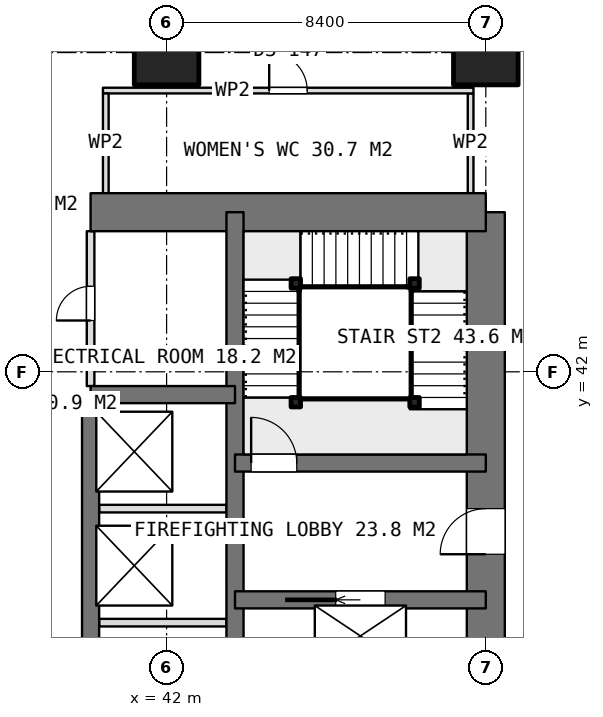
"""IFC4 building model, lengths in metres.
Left out: names, types, materials, properties, quantities, classifications, styles, units other than length and angle.
Written with IfcOpenShell. Run it as: python <this file> out.ifc"""

import sys

from ifc_helpers import new_model, si_unit, direction, frame, frame_2d, origin, origin_2d, place, context, subcontext, project, spatial, rectangle, extrude, element, fill, save


model = new_model("IFC4")
c1 = context("Model", 3, precision=1e-05, world=origin(), true_north=direction((0.0, 1.0)))
c2 = subcontext(c1, "Body", "Model", "MODEL_VIEW")
j1 = project(units=[si_unit("LENGTHUNIT", "METRE"), si_unit("PLANEANGLEUNIT", "RADIAN")], contexts=[c1])
p1 = place(None, origin())
s1 = spatial("IfcSite", under=j1, at=p1, CompositionType="ELEMENT")
p2 = place(p1, origin())
s2 = spatial("IfcBuilding", under=s1, at=p2, CompositionType="ELEMENT")
p3 = place(p2, frame((0.0, 0.0, 136.55)))
s3 = spatial("IfcBuildingStorey", under=s2, at=p3, CompositionType="ELEMENT", Elevation=136.55)
p4 = place(p3, frame((40.0, 46.2, 0.0), z_axis=(0.0, 0.0, 1.0), x_axis=(1.0, 0.0, 0.0)))
e1 = element("IfcWall", 1, at=p4, inside=s3, PredefinedType="SHEAR", context=c2, shape_type="SweptSolid", body=[
    extrude(rectangle(XDim=10.4, YDim=1.0, at=frame_2d((5.2, 0.0))), origin(), (0.0, 0.0, 1.0), 3.75),
])
p5 = place(p3, frame((50.4, 21.0, 0.0), z_axis=(0.0, 0.0, 1.0), x_axis=(0.0, 1.0, 0.0)))
e2 = element("IfcWall", 2, at=p5, inside=s3, PredefinedType="SHEAR", context=c2, shape_type="SweptSolid", body=[
    extrude(rectangle(XDim=25.2, YDim=1.0, at=frame_2d((12.6, 0.0))), origin(), (0.0, 0.0, 1.0), 3.75),
])
p6 = place(p5, frame((16.2, 0.0, 0.0)))
e3 = element("IfcOpeningElement", 3, at=p6, cuts=e2, PredefinedType="OPENING", context=c2, shape_type="SweptSolid", body=[
    extrude(rectangle(XDim=1.2, YDim=2.1, at=frame_2d((0.6, 1.05))), frame((0.0, 0.51, 0.0), z_axis=(0.0, -1.0, 0.0), x_axis=(1.0, 0.0, 0.0)), (0.0, 0.0, 1.0), 1.02),
])
p7 = place(p5, frame((10.05, 0.0, 0.0)))
e4 = element("IfcOpeningElement", 4, at=p7, cuts=e2, PredefinedType="OPENING", context=c2, shape_type="SweptSolid", body=[
    extrude(rectangle(XDim=0.9, YDim=2.1, at=frame_2d((0.45, 1.05))), frame((0.0, 0.51, 0.0), z_axis=(0.0, -1.0, 0.0), x_axis=(1.0, 0.0, 0.0)), (0.0, 0.0, 1.0), 1.02),
])
p8 = place(p5, frame((7.45, 0.0, 0.0)))
e5 = element("IfcOpeningElement", 5, at=p8, cuts=e2, PredefinedType="OPENING", context=c2, shape_type="SweptSolid", body=[
    extrude(rectangle(XDim=0.9, YDim=2.1, at=frame_2d((0.45, 1.05))), frame((0.0, 0.51, 0.0), z_axis=(0.0, -1.0, 0.0), x_axis=(1.0, 0.0, 0.0)), (0.0, 0.0, 1.0), 1.02),
])
p9 = place(p5, frame((0.7, 0.0, 0.0)))
e6 = element("IfcOpeningElement", 6, at=p9, cuts=e2, PredefinedType="OPENING", context=c2, shape_type="SweptSolid", body=[
    extrude(rectangle(XDim=1.2, YDim=2.1, at=frame_2d((0.6, 1.05))), frame((0.0, 0.51, 0.0), z_axis=(0.0, -1.0, 0.0), x_axis=(1.0, 0.0, 0.0)), (0.0, 0.0, 1.0), 1.02),
])
p10 = place(p3, frame((43.8, 21.0, 0.0), z_axis=(0.0, 0.0, 1.0), x_axis=(0.0, 1.0, 0.0)))
e7 = element("IfcWall", 7, at=p10, inside=s3, PredefinedType="SHEAR", context=c2, shape_type="SweptSolid", body=[
    extrude(rectangle(XDim=25.2, YDim=0.45, at=frame_2d((12.6, 0.0))), origin(), (0.0, 0.0, 1.0), 3.75),
])
p11 = place(p3, frame((40.0, 23.4, 0.0), z_axis=(0.0, 0.0, 1.0), x_axis=(0.0, 1.0, 0.0)))
e8 = element("IfcWall", 8, at=p11, inside=s3, PredefinedType="SHEAR", context=c2, shape_type="SweptSolid", body=[
    extrude(rectangle(XDim=18.0, YDim=0.45, at=frame_2d((9.0, 0.0))), origin(), (0.0, 0.0, 1.0), 3.75),
])
p12 = place(p11, frame((2.55, 0.0, 0.0)))
e9 = element("IfcOpeningElement", 9, at=p12, cuts=e8, PredefinedType="OPENING", context=c2, shape_type="SweptSolid", body=[
    extrude(rectangle(XDim=0.9, YDim=2.1, at=frame_2d((0.45, 1.05))), frame((0.0, 0.235, 0.0), z_axis=(0.0, -1.0, 0.0), x_axis=(1.0, 0.0, 0.0)), (0.0, 0.0, 1.0), 0.47),
])
p13 = place(p3, frame((40.0, 41.4, 0.0), z_axis=(0.0, 0.0, 1.0), x_axis=(1.0, 0.0, 0.0)))
e10 = element("IfcWall", 10, at=p13, inside=s3, PredefinedType="SHEAR", context=c2, shape_type="SweptSolid", body=[
    extrude(rectangle(XDim=3.8, YDim=0.45, at=frame_2d((1.9, 0.0))), origin(), (0.0, 0.0, 1.0), 3.75),
])
p14 = place(p3, frame((43.8, 36.0, 0.0), z_axis=(0.0, 0.0, 1.0), x_axis=(1.0, 0.0, 0.0)))
e11 = element("IfcWall", 11, at=p14, inside=s3, PredefinedType="SHEAR", context=c2, shape_type="SweptSolid", body=[
    extrude(rectangle(XDim=6.6, YDim=0.45, at=frame_2d((3.3, 0.0))), origin(), (0.0, 0.0, 1.0), 3.75),
])
p15 = place(p14, frame((2.65, 0.0, 0.0)))
e12 = element("IfcOpeningElement", 12, at=p15, cuts=e11, PredefinedType="OPENING", context=c2, shape_type="SweptSolid", body=[
    extrude(rectangle(XDim=1.3, YDim=2.1, at=frame_2d((0.65, 1.05))), frame((0.0, 0.235, 0.0), z_axis=(0.0, -1.0, 0.0), x_axis=(1.0, 0.0, 0.0)), (0.0, 0.0, 1.0), 0.47),
])
p16 = place(p3, frame((43.8, 39.6, 0.0), z_axis=(0.0, 0.0, 1.0), x_axis=(1.0, 0.0, 0.0)))
e13 = element("IfcWall", 13, at=p16, inside=s3, PredefinedType="SHEAR", context=c2, shape_type="SweptSolid", body=[
    extrude(rectangle(XDim=6.6, YDim=0.45, at=frame_2d((3.3, 0.0))), origin(), (0.0, 0.0, 1.0), 3.75),
])
p17 = place(p16, frame((0.425, 0.0, 0.0)))
e14 = element("IfcOpeningElement", 14, at=p17, cuts=e13, PredefinedType="OPENING", context=c2, shape_type="SweptSolid", body=[
    extrude(rectangle(XDim=1.2, YDim=2.1, at=frame_2d((0.6, 1.05))), frame((0.0, 0.235, 0.0), z_axis=(0.0, -1.0, 0.0), x_axis=(1.0, 0.0, 0.0)), (0.0, 0.0, 1.0), 0.47),
])
for number, where, z_axis, x_axis in (
    (15, (42.0, 50.4, 0.0), (0.0, 0.0, 1.0), (1.0, 0.0, 0.0)),
    (16, (50.4, 50.4, 0.0), (0.0, 0.0, 1.0), (1.0, 0.0, 0.0)),
):
    element("IfcColumn", number, at=place(p3, frame(where, z_axis=z_axis, x_axis=x_axis)), inside=s3, PredefinedType="COLUMN", context=c2, shape_type="SweptSolid", body=[
        extrude(rectangle(XDim=1.7, YDim=1.7, at=origin_2d()), origin(), (0.0, 0.0, 1.0), 3.75),
    ])
for number, where, z_axis, x_axis in (
    (17, (40.225, 35.4, 0.0), (0.0, 0.0, 1.0), (1.0, 0.0, 0.0)),
    (18, (40.225, 38.4, 0.0), (0.0, 0.0, 1.0), (1.0, 0.0, 0.0)),
):
    element("IfcWall", number, at=place(p3, frame(where, z_axis=z_axis, x_axis=x_axis)), inside=s3, PredefinedType="PARTITIONING", context=c2, shape_type="SweptSolid", body=[
        extrude(rectangle(XDim=3.35, YDim=0.2, at=frame_2d((1.675, 0.0))), origin(), (0.0, 0.0, 1.0), 3.5),
    ])
p18 = place(p3, frame((40.0, 41.625, 0.0), z_axis=(0.0, 0.0, 1.0), x_axis=(0.0, 1.0, 0.0)))
e19 = element("IfcWall", 19, at=p18, inside=s3, PredefinedType="PARTITIONING", context=c2, shape_type="SweptSolid", body=[
    extrude(rectangle(XDim=4.075, YDim=0.2, at=frame_2d((2.038, 0.0))), origin(), (0.0, 0.0, 1.0), 3.5),
])
p19 = place(p18, frame((1.725, 0.0, 0.0)))
e20 = element("IfcOpeningElement", 20, at=p19, cuts=e19, PredefinedType="OPENING", context=c2, shape_type="SweptSolid", body=[
    extrude(rectangle(XDim=0.9, YDim=2.1, at=frame_2d((0.45, 1.05))), frame((0.0, 0.11, 0.0), z_axis=(0.0, -1.0, 0.0), x_axis=(1.0, 0.0, 0.0)), (0.0, 0.0, 1.0), 0.22),
])
p20 = place(p3, frame((40.325, 49.4, 0.0), z_axis=(0.0, 0.0, 1.0), x_axis=(1.0, 0.0, 0.0)))
e21 = element("IfcWall", 21, at=p20, inside=s3, PredefinedType="PARTITIONING", context=c2, shape_type="SweptSolid", body=[
    extrude(rectangle(XDim=9.75, YDim=0.15, at=frame_2d((4.875, 0.0))), origin(), (0.0, 0.0, 1.0), 3.5),
])
p21 = place(p20, frame((4.375, 0.0, 0.0)))
e22 = element("IfcOpeningElement", 22, at=p21, cuts=e21, PredefinedType="OPENING", context=c2, shape_type="SweptSolid", body=[
    extrude(rectangle(XDim=1.0, YDim=2.1, at=frame_2d((0.5, 1.05))), frame((0.0, 0.085, 0.0), z_axis=(0.0, -1.0, 0.0), x_axis=(1.0, 0.0, 0.0)), (0.0, 0.0, 1.0), 0.17),
])
for number, where, z_axis, x_axis in (
    (23, (40.4, 46.7, 0.0), (0.0, 0.0, 1.0), (0.0, 1.0, 0.0)),
    (24, (50.0, 46.7, 0.0), (0.0, 0.0, 1.0), (0.0, 1.0, 0.0)),
):
    element("IfcWall", number, at=place(p3, frame(where, z_axis=z_axis, x_axis=x_axis)), inside=s3, PredefinedType="PARTITIONING", context=c2, shape_type="SweptSolid", body=[
        extrude(rectangle(XDim=2.625, YDim=0.15, at=frame_2d((1.312, 0.0))), origin(), (0.0, 0.0, 1.0), 3.5),
    ])
for number, where, z_axis, x_axis in (
    (25, (45.4, 41.2, 0.0), (0.0, 0.0, 1.0), (1.0, 0.0, 0.0)),
    (26, (45.4, 44.325, 0.0), (0.0, 0.0, 1.0), (1.0, 0.0, 0.0)),
    (27, (48.525, 44.325, 0.0), (0.0, 0.0, 1.0), (1.0, 0.0, 0.0)),
    (28, (48.525, 41.2, 0.0), (0.0, 0.0, 1.0), (1.0, 0.0, 0.0)),
):
    element("IfcColumn", number, at=place(p3, frame(where, z_axis=z_axis, x_axis=x_axis)), inside=s3, PredefinedType="COLUMN", context=c2, shape_type="SweptSolid", body=[
        extrude(rectangle(XDim=0.25, YDim=0.25, at=origin_2d()), origin(), (0.0, 0.0, 1.0), 3.75),
    ])
p22 = place(p6, origin())
e29 = element("IfcDoor", 29, at=p22, inside=s3, OperationType="SINGLE_SWING_LEFT", PredefinedType="DOOR", context=c2, shape_type="SweptSolid", body=[
    extrude(rectangle(XDim=1.2, YDim=2.1, at=frame_2d((0.6, 1.05))), frame((0.0, 0.025, 0.0), z_axis=(0.0, -1.0, 0.0), x_axis=(1.0, 0.0, 0.0)), (0.0, 0.0, 1.0), 0.05),
])
fill(e3, e29)
p23 = place(p19, origin())
e30 = element("IfcDoor", 30, at=p23, inside=s3, OperationType="SINGLE_SWING_LEFT", PredefinedType="DOOR", context=c2, shape_type="SweptSolid", body=[
    extrude(rectangle(XDim=0.9, YDim=2.1, at=frame_2d((0.45, 1.05))), frame((0.0, 0.025, 0.0), z_axis=(0.0, -1.0, 0.0), x_axis=(1.0, 0.0, 0.0)), (0.0, 0.0, 1.0), 0.05),
])
fill(e20, e30)
p24 = place(p15, origin())
e31 = element("IfcDoor", 31, at=p24, inside=s3, OperationType="SLIDING_TO_LEFT", PredefinedType="USERDEFINED", context=c2, shape_type="SweptSolid", body=[
    extrude(rectangle(XDim=1.3, YDim=2.1, at=frame_2d((0.65, 1.05))), frame((0.0, 0.025, 0.0), z_axis=(0.0, -1.0, 0.0), x_axis=(1.0, 0.0, 0.0)), (0.0, 0.0, 1.0), 0.05),
])
fill(e12, e31)
p25 = place(p21, origin())
e32 = element("IfcDoor", 32, at=p25, inside=s3, OperationType="SINGLE_SWING_LEFT", PredefinedType="DOOR", context=c2, shape_type="SweptSolid", body=[
    extrude(rectangle(XDim=1.0, YDim=2.1, at=frame_2d((0.5, 1.05))), frame((0.0, 0.025, 0.0), z_axis=(0.0, -1.0, 0.0), x_axis=(1.0, 0.0, 0.0)), (0.0, 0.0, 1.0), 0.05),
])
fill(e22, e32)
p26 = place(p17, origin())
e33 = element("IfcDoor", 33, at=p26, inside=s3, OperationType="SINGLE_SWING_RIGHT", PredefinedType="DOOR", context=c2, shape_type="SweptSolid", body=[
    extrude(rectangle(XDim=1.2, YDim=2.1, at=frame_2d((0.6, 1.05))), frame((0.0, 0.025, 0.0), z_axis=(0.0, -1.0, 0.0), x_axis=(1.0, 0.0, 0.0)), (0.0, 0.0, 1.0), 0.05),
])
fill(e14, e33)
save(model, sys.argv[1])
